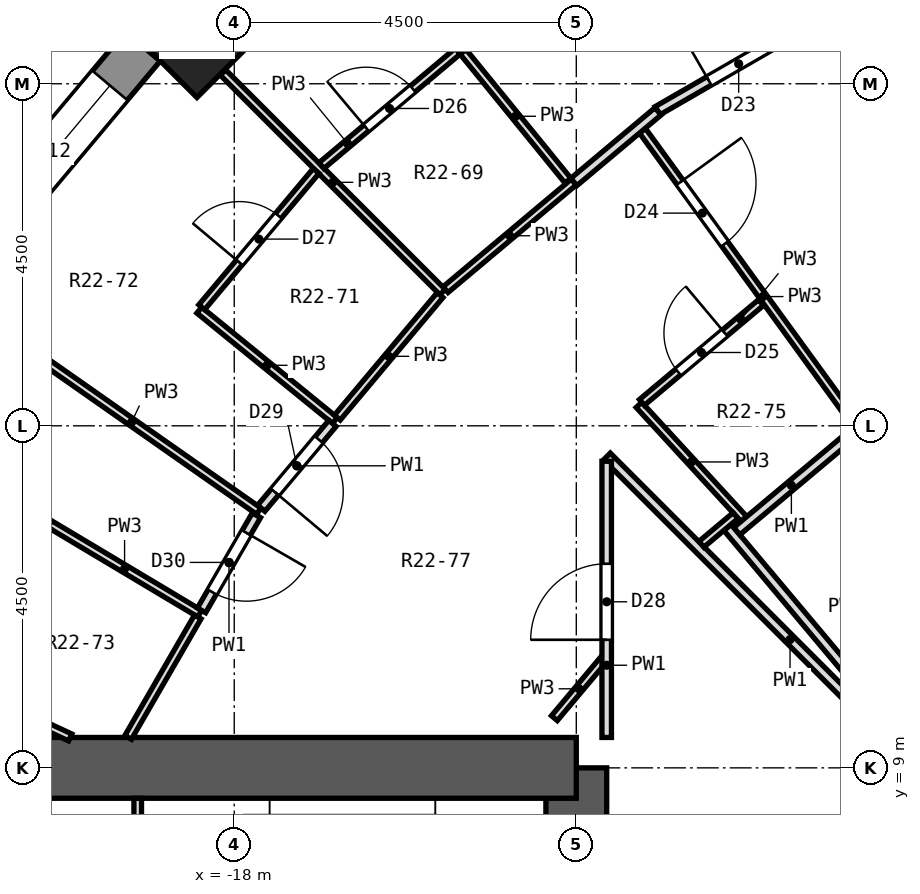
"""IFC4 building model, lengths in metres.
Left out: names, types, materials, properties, quantities, classifications, styles, units other than length and angle.
Written with IfcOpenShell. Run it as: python <this file> out.ifc"""

import sys

from ifc_helpers import new_model, si_unit, direction, frame, frame_2d, origin, origin_2d, place, context, subcontext, project, spatial, polyline, rectangle, outline, extrude, element, fill, save


model = new_model("IFC4")
c1 = context("Model", 3, precision=1e-05, world=origin(), true_north=direction((0.0, 1.0)))
c2 = subcontext(c1, "Body", "Model", "MODEL_VIEW")
j1 = project(units=[si_unit("LENGTHUNIT", "METRE"), si_unit("PLANEANGLEUNIT", "RADIAN")], contexts=[c1])
p1 = place(None, origin())
s1 = spatial("IfcSite", under=j1, at=p1, CompositionType="ELEMENT")
p2 = place(p1, origin())
s2 = spatial("IfcBuilding", under=s1, at=p2, CompositionType="ELEMENT")
p3 = place(p2, frame((0.0, 0.0, 141.4)))
s3 = spatial("IfcBuildingStorey", under=s2, at=p3, CompositionType="ELEMENT", Elevation=141.4)
p4 = place(p3, frame((-18.491, 18.491, 0.0), z_axis=(0.0, 0.0, 1.0), x_axis=(-0.707106781187, 0.707106781187, 0.0)))
e1 = element("IfcColumn", 1, at=p4, inside=s3, PredefinedType="COLUMN", context=c2, shape_type="SweptSolid", body=[
    extrude(rectangle(XDim=0.95, YDim=0.95, at=origin_2d()), origin(), (0.0, 0.0, 1.0), 3.3),
])
p5 = place(p3, frame((-13.5, -9.0, 0.0), z_axis=(0.0, 0.0, 1.0), x_axis=(0.0, 1.0, 0.0)))
e2 = element("IfcWall", 2, at=p5, inside=s3, PredefinedType="SHEAR", context=c2, shape_type="SweptSolid", body=[
    extrude(rectangle(XDim=18.0, YDim=0.8, at=frame_2d((9.0, 0.0))), origin(), (0.0, 0.0, 1.0), 3.3),
])
p6 = place(p5, frame((15.4, 0.0, 0.0)))
e3 = element("IfcOpeningElement", 3, at=p6, cuts=e2, PredefinedType="OPENING", context=c2, shape_type="SweptSolid", body=[
    extrude(rectangle(XDim=1.2, YDim=2.1, at=frame_2d((0.6, 1.05))), frame((0.0, 0.412, 0.0), z_axis=(0.0, -1.0, 0.0), x_axis=(1.0, 0.0, 0.0)), (0.0, 0.0, 1.0), 0.824),
])
p7 = place(p5, frame((1.4, 0.0, 0.0)))
e4 = element("IfcOpeningElement", 4, at=p7, cuts=e2, PredefinedType="OPENING", context=c2, shape_type="SweptSolid", body=[
    extrude(rectangle(XDim=1.2, YDim=2.1, at=frame_2d((0.6, 1.05))), frame((0.0, 0.412, 0.0), z_axis=(0.0, -1.0, 0.0), x_axis=(1.0, 0.0, 0.0)), (0.0, 0.0, 1.0), 0.824),
])
p8 = place(p5, frame((7.5, 0.0, 0.0)))
e5 = element("IfcOpeningElement", 5, at=p8, cuts=e2, PredefinedType="OPENING", context=c2, shape_type="SweptSolid", body=[
    extrude(rectangle(XDim=3.0, YDim=2.4, at=frame_2d((1.5, 1.2))), frame((0.0, 0.412, 0.0), z_axis=(0.0, -1.0, 0.0), x_axis=(1.0, 0.0, 0.0)), (0.0, 0.0, 1.0), 0.824),
])
p9 = place(p3, frame((-13.5, 9.0, 0.0), z_axis=(0.0, 0.0, 1.0), x_axis=(-1.0, 0.0, 0.0)))
e6 = element("IfcWall", 6, at=p9, inside=s3, PredefinedType="SHEAR", context=c2, shape_type="SweptSolid", body=[
    extrude(rectangle(XDim=10.4, YDim=0.8, at=frame_2d((5.2, 0.0))), origin(), (0.0, 0.0, 1.0), 3.3),
])
p10 = place(p3, frame((-19.202, 18.494, 0.0), z_axis=(0.0, 0.0, 1.0), x_axis=(-0.642774476932, -0.766055462616, 0.0)))
e7 = element("IfcWall", 7, at=p10, inside=s3, PredefinedType="SOLIDWALL", context=c2, shape_type="SweptSolid", body=[
    extrude(rectangle(XDim=3.648, YDim=0.6, at=frame_2d((1.824, 0.0))), origin(), (0.0, 0.0, 1.0), 2.8),
])
p11 = place(p10, frame((0.674, 0.0, 0.9)))
e8 = element("IfcOpeningElement", 8, at=p11, cuts=e7, PredefinedType="OPENING", context=c2, shape_type="SweptSolid", body=[
    extrude(rectangle(XDim=2.3, YDim=1.8, at=frame_2d((1.15, 0.9))), frame((0.0, 0.312, 0.0), z_axis=(0.0, -1.0, 0.0), x_axis=(1.0, 0.0, 0.0)), (0.0, 0.0, 1.0), 0.624),
])
p12 = place(p3, origin())
e9 = element("IfcWall", 9, at=p12, inside=s3, PredefinedType="SOLIDWALL", context=c2, shape_type="SweptSolid", body=[
    extrude(outline(polyline([(-18.686, 19.432), (-19.432, 18.686), (-18.972, 18.301), (-19.163, 18.491), (-18.491, 19.163), (-18.301, 18.972), (-18.686, 19.432)])), origin(), (0.0, 0.0, 1.0), 2.8),
])
p13 = place(p3, frame((-12.629, 17.382, 0.0), z_axis=(0.0, 0.0, 1.0), x_axis=(0.587934886014, -0.808908257967, 0.0)))
e10 = element("IfcWall", 10, at=p13, inside=s3, PredefinedType="PARTITIONING", context=c2, shape_type="SweptSolid", body=[
    extrude(rectangle(XDim=5.395, YDim=0.1, at=frame_2d((2.698, 0.0))), origin(), (0.0, 0.0, 1.0), 2.8),
])
p14 = place(p13, frame((0.84, 0.0, 0.0)))
e11 = element("IfcOpeningElement", 11, at=p14, cuts=e10, PredefinedType="OPENING", context=c2, shape_type="SweptSolid", body=[
    extrude(rectangle(XDim=1.0, YDim=2.1, at=frame_2d((0.5, 1.05))), frame((0.0, 0.062, 0.0), z_axis=(0.0, -1.0, 0.0), x_axis=(1.0, 0.0, 0.0)), (0.0, 0.0, 1.0), 0.124),
])
p15 = place(p3, frame((-14.989, 18.419, 0.0), z_axis=(0.0, 0.0, 1.0), x_axis=(0.63124481093, -0.775583643893, 0.0)))
e12 = element("IfcWall", 12, at=p15, inside=s3, PredefinedType="PARTITIONING", context=c2, shape_type="SweptSolid", body=[
    extrude(rectangle(XDim=2.184, YDim=0.1, at=frame_2d((1.092, 0.0))), origin(), (0.0, 0.0, 1.0), 2.8),
])
p16 = place(p3, frame((-11.511, 12.164, 0.0), z_axis=(0.0, 0.0, 1.0), x_axis=(0.64269368401, -0.766123246308, 0.0)))
e13 = element("IfcWall", 13, at=p16, inside=s3, PredefinedType="PARTITIONING", context=c2, shape_type="SweptSolid", body=[
    extrude(rectangle(XDim=4.826, YDim=0.125, at=frame_2d((2.413, 0.0))), origin(), (0.0, 0.0, 1.0), 2.8),
])
p17 = place(p3, frame((-12.675, 13.776, 0.0), z_axis=(0.0, 0.0, 1.0), x_axis=(0.676672647076, -0.736284000029, 0.0)))
e14 = element("IfcWall", 14, at=p17, inside=s3, PredefinedType="PARTITIONING", context=c2, shape_type="SweptSolid", body=[
    extrude(rectangle(XDim=2.04, YDim=0.1, at=frame_2d((1.02, 0.0))), origin(), (0.0, 0.0, 1.0), 2.8),
])
p18 = place(p3, frame((-18.148, 18.148, 0.0), z_axis=(0.0, 0.0, 1.0), x_axis=(0.707106781187, -0.707106781187, 0.0)))
e15 = element("IfcWall", 15, at=p18, inside=s3, PredefinedType="PARTITIONING", context=c2, shape_type="SweptSolid", body=[
    extrude(rectangle(XDim=4.085, YDim=0.1, at=frame_2d((2.043, 0.0))), origin(), (0.0, 0.0, 1.0), 2.8),
])
p19 = place(p3, frame((-13.097, 13.097, 0.0), z_axis=(0.0, 0.0, 1.0), x_axis=(0.707106781187, -0.707106781187, 0.0)))
e16 = element("IfcWall", 16, at=p19, inside=s3, PredefinedType="PARTITIONING", context=c2, shape_type="SweptSolid", body=[
    extrude(rectangle(XDim=6.815, YDim=0.125, at=frame_2d((3.407, 0.0))), origin(), (0.0, 0.0, 1.0), 2.8),
])
p20 = place(p3, frame((-18.46, 15.022, 0.0), z_axis=(0.0, 0.0, 1.0), x_axis=(0.775591007639, -0.6312357633, 0.0)))
e17 = element("IfcWall", 17, at=p20, inside=s3, PredefinedType="PARTITIONING", context=c2, shape_type="SweptSolid", body=[
    extrude(rectangle(XDim=2.3, YDim=0.1, at=frame_2d((1.15, 0.0))), origin(), (0.0, 0.0, 1.0), 2.8),
])
p21 = place(p3, frame((-21.024, 14.721, 0.0), z_axis=(0.0, 0.0, 1.0), x_axis=(0.819108383097, -0.573638785945, 0.0)))
e18 = element("IfcWall", 18, at=p21, inside=s3, PredefinedType="PARTITIONING", context=c2, shape_type="SweptSolid", body=[
    extrude(rectangle(XDim=4.086, YDim=0.1, at=frame_2d((2.043, 0.0))), origin(), (0.0, 0.0, 1.0), 2.8),
])
p22 = place(p3, frame((-20.43, 12.209, 0.0), z_axis=(0.0, 0.0, 1.0), x_axis=(0.858446574718, -0.512902991174, 0.0)))
e19 = element("IfcWall", 19, at=p22, inside=s3, PredefinedType="PARTITIONING", context=c2, shape_type="SweptSolid", body=[
    extrude(rectangle(XDim=2.301, YDim=0.1, at=frame_2d((1.15, 0.0))), origin(), (0.0, 0.0, 1.0), 2.8),
])
p23 = place(p3, frame((-23.26, 10.847, 0.0), z_axis=(0.0, 0.0, 1.0), x_axis=(0.906223222272, -0.422799564114, 0.0)))
e20 = element("IfcWall", 20, at=p23, inside=s3, PredefinedType="PARTITIONING", context=c2, shape_type="SweptSolid", body=[
    extrude(rectangle(XDim=3.423, YDim=0.1, at=frame_2d((1.711, 0.0))), origin(), (0.0, 0.0, 1.0), 2.8),
])
p24 = place(p3, frame((-12.432, 17.645, 0.0), z_axis=(0.0, 0.0, 1.0), x_axis=(0.866012062527, 0.500023107024, 0.0)))
e21 = element("IfcWall", 21, at=p24, inside=s3, PredefinedType="PARTITIONING", context=c2, shape_type="SweptSolid", body=[
    extrude(rectangle(XDim=3.772, YDim=0.125, at=frame_2d((1.886, 0.0))), origin(), (0.0, 0.0, 1.0), 2.8),
])
p25 = place(p24, frame((0.783, 0.0, 0.0)))
e22 = element("IfcOpeningElement", 22, at=p25, cuts=e21, PredefinedType="OPENING", context=c2, shape_type="SweptSolid", body=[
    extrude(rectangle(XDim=0.9, YDim=2.1, at=frame_2d((0.45, 1.05))), frame((0.0, 0.074, 0.0), z_axis=(0.0, -1.0, 0.0), x_axis=(1.0, 0.0, 0.0)), (0.0, 0.0, 1.0), 0.149),
])
p26 = place(p3, frame((-11.388, 12.114, 0.0), z_axis=(0.0, 0.0, 1.0), x_axis=(0.766199817297, 0.642602396489, 0.0)))
e23 = element("IfcWall", 23, at=p26, inside=s3, PredefinedType="PARTITIONING", context=c2, shape_type="SweptSolid", body=[
    extrude(rectangle(XDim=1.875, YDim=0.125, at=frame_2d((0.937, 0.0))), origin(), (0.0, 0.0, 1.0), 2.8),
])
p27 = place(p3, frame((-11.854, 11.941, 0.0), z_axis=(0.0, 0.0, 1.0), x_axis=(0.765622887771, 0.643289665486, 0.0)))
e24 = element("IfcWall", 24, at=p27, inside=s3, PredefinedType="PARTITIONING", context=c2, shape_type="SweptSolid", body=[
    extrude(rectangle(XDim=0.587, YDim=0.1, at=frame_2d((0.293, 0.0))), origin(), (0.0, 0.0, 1.0), 2.8),
])
p28 = place(p3, frame((-12.637, 13.808, 0.0), z_axis=(0.0, 0.0, 1.0), x_axis=(0.766269322056, 0.64251951416, 0.0)))
e25 = element("IfcWall", 25, at=p28, inside=s3, PredefinedType="PARTITIONING", context=c2, shape_type="SweptSolid", body=[
    extrude(rectangle(XDim=2.044, YDim=0.1, at=frame_2d((1.022, 0.0))), origin(), (0.0, 0.0, 1.0), 2.8),
])
p29 = place(p28, frame((0.622, 0.0, 0.0)))
e26 = element("IfcOpeningElement", 26, at=p29, cuts=e25, PredefinedType="OPENING", context=c2, shape_type="SweptSolid", body=[
    extrude(rectangle(XDim=0.8, YDim=2.1, at=frame_2d((0.4, 1.05))), frame((0.0, 0.062, 0.0), z_axis=(0.0, -1.0, 0.0), x_axis=(1.0, 0.0, 0.0)), (0.0, 0.0, 1.0), 0.124),
])
p30 = place(p3, frame((-15.22, 15.292, 0.0), z_axis=(0.0, 0.0, 1.0), x_axis=(0.766073622953, 0.642752832911, 0.0)))
e27 = element("IfcWall", 27, at=p30, inside=s3, PredefinedType="PARTITIONING", context=c2, shape_type="SweptSolid", body=[
    extrude(rectangle(XDim=2.203, YDim=0.1, at=frame_2d((1.102, 0.0))), origin(), (0.0, 0.0, 1.0), 2.8),
])
p31 = place(p3, frame((-13.532, 16.708, 0.0), z_axis=(0.0, 0.0, 1.0), x_axis=(0.766167387458, 0.642641061866, 0.0)))
e28 = element("IfcWall", 28, at=p31, inside=s3, PredefinedType="PARTITIONING", context=c2, shape_type="SweptSolid", body=[
    extrude(rectangle(XDim=1.445, YDim=0.125, at=frame_2d((0.722, 0.0))), origin(), (0.0, 0.0, 1.0), 2.8),
])
p32 = place(p3, frame((-16.853, 16.923, 0.0), z_axis=(0.0, 0.0, 1.0), x_axis=(0.765924716163, 0.642930267735, 0.0)))
e29 = element("IfcWall", 29, at=p32, inside=s3, PredefinedType="PARTITIONING", context=c2, shape_type="SweptSolid", body=[
    extrude(rectangle(XDim=2.34, YDim=0.1, at=frame_2d((1.17, 0.0))), origin(), (0.0, 0.0, 1.0), 2.8),
])
p33 = place(p32, frame((0.769, 0.0, 0.0)))
e30 = element("IfcOpeningElement", 30, at=p33, cuts=e29, PredefinedType="OPENING", context=c2, shape_type="SweptSolid", body=[
    extrude(rectangle(XDim=0.8, YDim=2.1, at=frame_2d((0.4, 1.05))), frame((0.0, 0.062, 0.0), z_axis=(0.0, -1.0, 0.0), x_axis=(1.0, 0.0, 0.0)), (0.0, 0.0, 1.0), 0.124),
])
p34 = place(p3, frame((-13.788, 9.654, 0.0), z_axis=(0.0, 0.0, 1.0), x_axis=(0.64289662775, 0.765952952881, 0.0)))
e31 = element("IfcWall", 31, at=p34, inside=s3, PredefinedType="PARTITIONING", context=c2, shape_type="SweptSolid", body=[
    extrude(rectangle(XDim=1.008, YDim=0.1, at=frame_2d((0.504, 0.0))), origin(), (0.0, 0.0, 1.0), 2.8),
])
p35 = place(p3, frame((-16.644, 13.608, 0.0), z_axis=(0.0, 0.0, 1.0), x_axis=(0.642715569181, 0.766104886508, 0.0)))
e32 = element("IfcWall", 32, at=p35, inside=s3, PredefinedType="PARTITIONING", context=c2, shape_type="SweptSolid", body=[
    extrude(rectangle(XDim=2.103, YDim=0.1, at=frame_2d((1.052, 0.0))), origin(), (0.0, 0.0, 1.0), 2.8),
])
p36 = place(p3, frame((-17.645, 12.415, 0.0), z_axis=(0.0, 0.0, 1.0), x_axis=(0.642669367872, 0.766143644233, 0.0)))
e33 = element("IfcWall", 33, at=p36, inside=s3, PredefinedType="PARTITIONING", context=c2, shape_type="SweptSolid", body=[
    extrude(rectangle(XDim=1.457, YDim=0.125, at=frame_2d((0.729, 0.0))), origin(), (0.0, 0.0, 1.0), 2.8),
])
p37 = place(p36, frame((0.279, 0.0, 0.0)))
e34 = element("IfcOpeningElement", 34, at=p37, cuts=e33, PredefinedType="OPENING", context=c2, shape_type="SweptSolid", body=[
    extrude(rectangle(XDim=0.9, YDim=2.1, at=frame_2d((0.45, 1.05))), frame((0.0, 0.074, 0.0), z_axis=(0.0, -1.0, 0.0), x_axis=(1.0, 0.0, 0.0)), (0.0, 0.0, 1.0), 0.149),
])
p38 = place(p3, frame((-18.428, 15.06, 0.0), z_axis=(0.0, 0.0, 1.0), x_axis=(0.642930267735, 0.765924716163, 0.0)))
e35 = element("IfcWall", 35, at=p38, inside=s3, PredefinedType="PARTITIONING", context=c2, shape_type="SweptSolid", body=[
    extrude(rectangle(XDim=2.34, YDim=0.1, at=frame_2d((1.17, 0.0))), origin(), (0.0, 0.0, 1.0), 2.8),
])
p39 = place(p38, frame((0.77, 0.0, 0.0)))
e36 = element("IfcOpeningElement", 36, at=p39, cuts=e35, PredefinedType="OPENING", context=c2, shape_type="SweptSolid", body=[
    extrude(rectangle(XDim=0.8, YDim=2.1, at=frame_2d((0.4, 1.05))), frame((0.0, 0.062, 0.0), z_axis=(0.0, -1.0, 0.0), x_axis=(1.0, 0.0, 0.0)), (0.0, 0.0, 1.0), 0.124),
])
p40 = place(p3, frame((-19.396, 9.4, 0.0), z_axis=(0.0, 0.0, 1.0), x_axis=(0.500210961829, 0.865903570651, 0.0)))
e37 = element("IfcWall", 37, at=p40, inside=s3, PredefinedType="PARTITIONING", context=c2, shape_type="SweptSolid", body=[
    extrude(rectangle(XDim=1.831, YDim=0.1, at=frame_2d((0.916, 0.0))), origin(), (0.0, 0.0, 1.0), 2.8),
])
p41 = place(p3, frame((-18.43, 11.072, 0.0), z_axis=(0.0, 0.0, 1.0), x_axis=(0.499849317439, 0.866112382925, 0.0)))
e38 = element("IfcWall", 38, at=p41, inside=s3, PredefinedType="PARTITIONING", context=c2, shape_type="SweptSolid", body=[
    extrude(rectangle(XDim=1.444, YDim=0.125, at=frame_2d((0.722, 0.0))), origin(), (0.0, 0.0, 1.0), 2.8),
])
p42 = place(p41, frame((0.278, 0.0, 0.0)))
e39 = element("IfcOpeningElement", 39, at=p42, cuts=e38, PredefinedType="OPENING", context=c2, shape_type="SweptSolid", body=[
    extrude(rectangle(XDim=0.9, YDim=2.1, at=frame_2d((0.45, 1.05))), frame((0.0, 0.074, 0.0), z_axis=(0.0, -1.0, 0.0), x_axis=(1.0, 0.0, 0.0)), (0.0, 0.0, 1.0), 0.149),
])
p43 = place(p3, frame((-13.1, 9.4, 0.0), z_axis=(0.0, 0.0, 1.0), x_axis=(0.0, 1.0, 0.0)))
e40 = element("IfcWall", 40, at=p43, inside=s3, PredefinedType="PARTITIONING", context=c2, shape_type="SweptSolid", body=[
    extrude(rectangle(XDim=3.634, YDim=0.125, at=frame_2d((1.817, 0.0))), origin(), (0.0, 0.0, 1.0), 2.8),
])
p44 = place(p43, frame((1.285, 0.0, 0.0)))
e41 = element("IfcOpeningElement", 41, at=p44, cuts=e40, PredefinedType="OPENING", context=c2, shape_type="SweptSolid", body=[
    extrude(rectangle(XDim=1.0, YDim=2.1, at=frame_2d((0.5, 1.05))), frame((0.0, 0.074, 0.0), z_axis=(0.0, -1.0, 0.0), x_axis=(1.0, 0.0, 0.0)), (0.0, 0.0, 1.0), 0.149),
])
p45 = place(p3, frame((-19.27, 5.25, 0.0), z_axis=(0.0, 0.0, 1.0), x_axis=(0.0, 1.0, 0.0)))
e42 = element("IfcWall", 42, at=p45, inside=s3, PredefinedType="PARTITIONING", context=c2, shape_type="SweptSolid", body=[
    extrude(rectangle(XDim=3.35, YDim=0.1, at=frame_2d((1.675, 0.0))), origin(), (0.0, 0.0, 1.0), 2.8),
])
p46 = place(p11, origin())
e43 = element("IfcWindow", 43, at=p46, inside=s3, PartitioningType="SINGLE_PANEL", PredefinedType="WINDOW", context=c2, shape_type="SweptSolid", body=[
    extrude(rectangle(XDim=2.3, YDim=1.8, at=frame_2d((1.15, 0.9))), frame((0.0, 0.18, 0.0), z_axis=(0.0, -1.0, 0.0), x_axis=(1.0, 0.0, 0.0)), (0.0, 0.0, 1.0), 0.06),
])
fill(e8, e43)
p47 = place(p25, origin())
e44 = element("IfcDoor", 44, at=p47, inside=s3, OperationType="SINGLE_SWING_LEFT", PredefinedType="DOOR", context=c2, shape_type="SweptSolid", body=[
    extrude(rectangle(XDim=0.9, YDim=2.1, at=frame_2d((0.45, 1.05))), frame((0.0, 0.025, 0.0), z_axis=(0.0, -1.0, 0.0), x_axis=(1.0, 0.0, 0.0)), (0.0, 0.0, 1.0), 0.05),
])
fill(e22, e44)
p48 = place(p14, origin())
e45 = element("IfcDoor", 45, at=p48, inside=s3, OperationType="SINGLE_SWING_LEFT", PredefinedType="DOOR", context=c2, shape_type="SweptSolid", body=[
    extrude(rectangle(XDim=1.0, YDim=2.1, at=frame_2d((0.5, 1.05))), frame((0.0, 0.025, 0.0), z_axis=(0.0, -1.0, 0.0), x_axis=(1.0, 0.0, 0.0)), (0.0, 0.0, 1.0), 0.05),
])
fill(e11, e45)
p49 = place(p29, origin())
e46 = element("IfcDoor", 46, at=p49, inside=s3, OperationType="SINGLE_SWING_RIGHT", PredefinedType="DOOR", context=c2, shape_type="SweptSolid", body=[
    extrude(rectangle(XDim=0.8, YDim=2.1, at=frame_2d((0.4, 1.05))), frame((0.0, 0.025, 0.0), z_axis=(0.0, -1.0, 0.0), x_axis=(1.0, 0.0, 0.0)), (0.0, 0.0, 1.0), 0.05),
])
fill(e26, e46)
p50 = place(p33, origin())
e47 = element("IfcDoor", 47, at=p50, inside=s3, OperationType="SINGLE_SWING_LEFT", PredefinedType="DOOR", context=c2, shape_type="SweptSolid", body=[
    extrude(rectangle(XDim=0.8, YDim=2.1, at=frame_2d((0.4, 1.05))), frame((0.0, 0.025, 0.0), z_axis=(0.0, -1.0, 0.0), x_axis=(1.0, 0.0, 0.0)), (0.0, 0.0, 1.0), 0.05),
])
fill(e30, e47)
p51 = place(p39, origin())
e48 = element("IfcDoor", 48, at=p51, inside=s3, OperationType="SINGLE_SWING_LEFT", PredefinedType="DOOR", context=c2, shape_type="SweptSolid", body=[
    extrude(rectangle(XDim=0.8, YDim=2.1, at=frame_2d((0.4, 1.05))), frame((0.0, 0.025, 0.0), z_axis=(0.0, -1.0, 0.0), x_axis=(1.0, 0.0, 0.0)), (0.0, 0.0, 1.0), 0.05),
])
fill(e36, e48)
p52 = place(p44, origin())
e49 = element("IfcDoor", 49, at=p52, inside=s3, OperationType="SINGLE_SWING_LEFT", PredefinedType="DOOR", context=c2, shape_type="SweptSolid", body=[
    extrude(rectangle(XDim=1.0, YDim=2.1, at=frame_2d((0.5, 1.05))), frame((0.0, 0.025, 0.0), z_axis=(0.0, -1.0, 0.0), x_axis=(1.0, 0.0, 0.0)), (0.0, 0.0, 1.0), 0.05),
])
fill(e41, e49)
p53 = place(p37, frame((0.9, 0.0, 0.0), z_axis=(0.0, 0.0, 1.0), x_axis=(-1.0, 0.0, 0.0)))
e50 = element("IfcDoor", 50, at=p53, inside=s3, OperationType="SINGLE_SWING_RIGHT", PredefinedType="DOOR", context=c2, shape_type="SweptSolid", body=[
    extrude(rectangle(XDim=0.9, YDim=2.1, at=frame_2d((0.45, 1.05))), frame((0.0, 0.025, 0.0), z_axis=(0.0, -1.0, 0.0), x_axis=(1.0, 0.0, 0.0)), (0.0, 0.0, 1.0), 0.05),
])
fill(e34, e50)
p54 = place(p42, frame((0.9, 0.0, 0.0), z_axis=(0.0, 0.0, 1.0), x_axis=(-1.0, 0.0, 0.0)))
e51 = element("IfcDoor", 51, at=p54, inside=s3, OperationType="SINGLE_SWING_LEFT", PredefinedType="DOOR", context=c2, shape_type="SweptSolid", body=[
    extrude(rectangle(XDim=0.9, YDim=2.1, at=frame_2d((0.45, 1.05))), frame((0.0, 0.025, 0.0), z_axis=(0.0, -1.0, 0.0), x_axis=(1.0, 0.0, 0.0)), (0.0, 0.0, 1.0), 0.05),
])
fill(e39, e51)
save(model, sys.argv[1])
